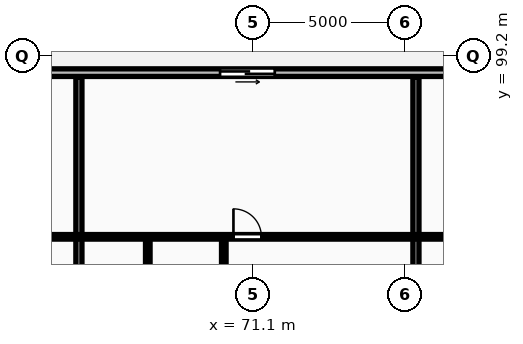
"""IFC4 building model, lengths in metres.
Left out: names, types, materials, properties, quantities, classifications, styles, units other than length and angle.
Written with IfcOpenShell. Run it as: python <this file> out.ifc"""

import sys

from ifc_helpers import new_model, si_unit, direction, frame, frame_2d, origin, place, context, subcontext, project, spatial, rectangle, extrude, element, fill, save


model = new_model("IFC4")
c1 = context("Model", 3, precision=1e-05, world=origin(), true_north=direction((0.0, 1.0)))
c2 = subcontext(c1, "Body", "Model", "MODEL_VIEW")
j1 = project(units=[si_unit("LENGTHUNIT", "METRE"), si_unit("PLANEANGLEUNIT", "RADIAN")], contexts=[c1])
p1 = place(None, origin())
s1 = spatial("IfcSite", under=j1, at=p1, CompositionType="ELEMENT")
p2 = place(p1, origin())
s2 = spatial("IfcBuilding", under=s1, at=p2, CompositionType="ELEMENT")
p3 = place(p2, frame((0.0, 0.0, 24.0)))
s3 = spatial("IfcBuildingStorey", under=s2, at=p3, CompositionType="ELEMENT", Elevation=24.0)
p4 = place(p3, frame((132.9, 98.65, 0.0), z_axis=(0.0, 0.0, 1.0), x_axis=(-1.0, 0.0, 0.0)))
e1 = element("IfcWall", 1, at=p4, inside=s3, PredefinedType="STANDARD", context=c2, shape_type="SweptSolid", body=[
    extrude(rectangle(XDim=77.6, YDim=0.25, at=frame_2d((38.8, 0.0))), origin(), (0.0, 0.0, 1.0), 2.97),
])
p5 = place(p4, frame((71.661, 0.0, 0.0)))
e2 = element("IfcOpeningElement", 2, at=p5, cuts=e1, PredefinedType="OPENING", context=c2, shape_type="SweptSolid", body=[
    extrude(rectangle(XDim=1.8, YDim=2.2, at=frame_2d((0.9, 1.1))), frame((0.0, 0.135, 0.0), z_axis=(0.0, -1.0, 0.0), x_axis=(1.0, 0.0, 0.0)), (0.0, 0.0, 1.0), 0.27),
])
p6 = place(p4, frame((61.079, 0.0, 0.0)))
e3 = element("IfcOpeningElement", 3, at=p6, cuts=e1, PredefinedType="OPENING", context=c2, shape_type="SweptSolid", body=[
    extrude(rectangle(XDim=1.8, YDim=2.2, at=frame_2d((0.9, 1.1))), frame((0.0, 0.135, 0.0), z_axis=(0.0, -1.0, 0.0), x_axis=(1.0, 0.0, 0.0)), (0.0, 0.0, 1.0), 0.27),
])
p7 = place(p4, frame((50.498, 0.0, 0.0)))
e4 = element("IfcOpeningElement", 4, at=p7, cuts=e1, PredefinedType="OPENING", context=c2, shape_type="SweptSolid", body=[
    extrude(rectangle(XDim=1.8, YDim=2.2, at=frame_2d((0.9, 1.1))), frame((0.0, 0.135, 0.0), z_axis=(0.0, -1.0, 0.0), x_axis=(1.0, 0.0, 0.0)), (0.0, 0.0, 1.0), 0.27),
])
p8 = place(p4, frame((39.412, 0.0, 0.0)))
e5 = element("IfcOpeningElement", 5, at=p8, cuts=e1, PredefinedType="OPENING", context=c2, shape_type="SweptSolid", body=[
    extrude(rectangle(XDim=1.8, YDim=2.2, at=frame_2d((0.9, 1.1))), frame((0.0, 0.135, 0.0), z_axis=(0.0, -1.0, 0.0), x_axis=(1.0, 0.0, 0.0)), (0.0, 0.0, 1.0), 0.27),
])
p9 = place(p4, frame((28.326, 0.0, 0.0)))
e6 = element("IfcOpeningElement", 6, at=p9, cuts=e1, PredefinedType="OPENING", context=c2, shape_type="SweptSolid", body=[
    extrude(rectangle(XDim=1.8, YDim=2.2, at=frame_2d((0.9, 1.1))), frame((0.0, 0.135, 0.0), z_axis=(0.0, -1.0, 0.0), x_axis=(1.0, 0.0, 0.0)), (0.0, 0.0, 1.0), 0.27),
])
p10 = place(p4, frame((17.744, 0.0, 0.0)))
e7 = element("IfcOpeningElement", 7, at=p10, cuts=e1, PredefinedType="OPENING", context=c2, shape_type="SweptSolid", body=[
    extrude(rectangle(XDim=1.8, YDim=2.2, at=frame_2d((0.9, 1.1))), frame((0.0, 0.135, 0.0), z_axis=(0.0, -1.0, 0.0), x_axis=(1.0, 0.0, 0.0)), (0.0, 0.0, 1.0), 0.27),
])
p11 = place(p4, frame((6.901, 0.0, 0.0)))
e8 = element("IfcOpeningElement", 8, at=p11, cuts=e1, PredefinedType="OPENING", context=c2, shape_type="SweptSolid", body=[
    extrude(rectangle(XDim=1.8, YDim=2.2, at=frame_2d((0.9, 1.1))), frame((0.0, 0.135, 0.0), z_axis=(0.0, -1.0, 0.0), x_axis=(1.0, 0.0, 0.0)), (0.0, 0.0, 1.0), 0.27),
])
p12 = place(p4, frame((0.6, 0.0, 0.85)))
e9 = element("IfcOpeningElement", 9, at=p12, cuts=e1, PredefinedType="OPENING", context=c2, shape_type="SweptSolid", body=[
    extrude(rectangle(XDim=1.8, YDim=1.8, at=frame_2d((0.9, 0.9))), frame((0.0, 0.135, 0.0), z_axis=(0.0, -1.0, 0.0), x_axis=(1.0, 0.0, 0.0)), (0.0, 0.0, 1.0), 0.27),
])
p13 = place(p3, frame((65.378, 69.43, 0.0), z_axis=(0.0, 0.0, 1.0), x_axis=(0.0, 1.0, 0.0)))
e10 = element("IfcWall", 10, at=p13, inside=s3, PredefinedType="PARTITIONING", context=c2, shape_type="SweptSolid", body=[
    extrude(rectangle(XDim=29.07, YDim=0.2, at=frame_2d((14.535, 0.0))), origin(), (0.0, 0.0, 1.0), 2.97),
])
p14 = place(p3, frame((55.38, 93.25, 0.0), z_axis=(0.0, 0.0, 1.0), x_axis=(1.0, 0.0, 0.0)))
e11 = element("IfcWall", 11, at=p14, inside=s3, PredefinedType="PARTITIONING", context=c2, shape_type="SweptSolid", body=[
    extrude(rectangle(XDim=9.918, YDim=0.15, at=frame_2d((4.959, 0.0))), origin(), (0.0, 0.0, 1.0), 2.97),
])
p15 = place(p14, frame((6.127, 0.0, 0.0)))
e12 = element("IfcOpeningElement", 12, at=p15, cuts=e11, PredefinedType="OPENING", context=c2, shape_type="SweptSolid", body=[
    extrude(rectangle(XDim=0.92, YDim=2.08, at=frame_2d((0.46, 1.04))), frame((0.0, 0.085, 0.0), z_axis=(0.0, -1.0, 0.0), x_axis=(1.0, 0.0, 0.0)), (0.0, 0.0, 1.0), 0.17),
])
p16 = place(p3, frame((76.464, 69.43, 0.0), z_axis=(0.0, 0.0, 1.0), x_axis=(0.0, 1.0, 0.0)))
e13 = element("IfcWall", 13, at=p16, inside=s3, PredefinedType="PARTITIONING", context=c2, shape_type="SweptSolid", body=[
    extrude(rectangle(XDim=29.07, YDim=0.2, at=frame_2d((14.535, 0.0))), origin(), (0.0, 0.0, 1.0), 2.22),
])
p17 = place(p3, frame((67.644, 88.19, 0.0), z_axis=(0.0, 0.0, 1.0), x_axis=(0.0, 1.0, 0.0)))
e14 = element("IfcWall", 14, at=p17, inside=s3, PredefinedType="PARTITIONING", context=c2, shape_type="SweptSolid", body=[
    extrude(rectangle(XDim=5.0, YDim=0.15, at=frame_2d((2.5, 0.0))), origin(), (0.0, 0.0, 1.0), 2.22),
])
p18 = place(p17, frame((0.419, 0.0, 0.0)))
e15 = element("IfcOpeningElement", 15, at=p18, cuts=e14, PredefinedType="OPENING", context=c2, shape_type="SweptSolid", body=[
    extrude(rectangle(XDim=0.84, YDim=2.04, at=frame_2d((0.42, 1.02))), frame((0.0, 0.085, 0.0), z_axis=(0.0, -1.0, 0.0), x_axis=(1.0, 0.0, 0.0)), (0.0, 0.0, 1.0), 0.17),
])
p19 = place(p3, frame((70.144, 88.19, 0.0), z_axis=(0.0, 0.0, 1.0), x_axis=(0.0, 1.0, 0.0)))
e16 = element("IfcWall", 16, at=p19, inside=s3, PredefinedType="PARTITIONING", context=c2, shape_type="SweptSolid", body=[
    extrude(rectangle(XDim=5.0, YDim=0.15, at=frame_2d((2.5, 0.0))), origin(), (0.0, 0.0, 1.0), 2.97),
])
p20 = place(p19, frame((0.4, 0.0, 0.0)))
e17 = element("IfcOpeningElement", 17, at=p20, cuts=e16, PredefinedType="OPENING", context=c2, shape_type="SweptSolid", body=[
    extrude(rectangle(XDim=0.84, YDim=2.04, at=frame_2d((0.42, 1.02))), frame((0.0, 0.085, 0.0), z_axis=(0.0, -1.0, 0.0), x_axis=(1.0, 0.0, 0.0)), (0.0, 0.0, 1.0), 0.17),
])
p21 = place(p3, frame((65.458, 93.25, 0.0), z_axis=(0.0, 0.0, 1.0), x_axis=(1.0, 0.0, 0.0)))
e18 = element("IfcWall", 18, at=p21, inside=s3, PredefinedType="PARTITIONING", context=c2, shape_type="SweptSolid", body=[
    extrude(rectangle(XDim=10.926, YDim=0.15, at=frame_2d((5.463, 0.0))), origin(), (0.0, 0.0, 1.0), 2.97),
])
p22 = place(p21, frame((5.003, 0.0, 0.0)))
e19 = element("IfcOpeningElement", 19, at=p22, cuts=e18, PredefinedType="OPENING", context=c2, shape_type="SweptSolid", body=[
    extrude(rectangle(XDim=0.92, YDim=2.08, at=frame_2d((0.46, 1.04))), frame((0.0, 0.085, 0.0), z_axis=(0.0, -1.0, 0.0), x_axis=(1.0, 0.0, 0.0)), (0.0, 0.0, 1.0), 0.17),
])
p23 = place(p3, frame((76.544, 93.25, 0.0), z_axis=(0.0, 0.0, 1.0), x_axis=(1.0, 0.0, 0.0)))
e20 = element("IfcWall", 20, at=p23, inside=s3, PredefinedType="PARTITIONING", context=c2, shape_type="SweptSolid", body=[
    extrude(rectangle(XDim=9.918, YDim=0.15, at=frame_2d((4.959, 0.0))), origin(), (0.0, 0.0, 1.0), 2.97),
])
p24 = place(p23, frame((4.499, 0.0, 0.0)))
e21 = element("IfcOpeningElement", 21, at=p24, cuts=e20, PredefinedType="OPENING", context=c2, shape_type="SweptSolid", body=[
    extrude(rectangle(XDim=0.92, YDim=2.08, at=frame_2d((0.46, 1.04))), frame((0.0, 0.085, 0.0), z_axis=(0.0, -1.0, 0.0), x_axis=(1.0, 0.0, 0.0)), (0.0, 0.0, 1.0), 0.17),
])
p25 = place(p6, origin())
e22 = element("IfcDoor", 22, at=p25, inside=s3, OperationType="SLIDING_TO_LEFT", PredefinedType="DOOR", context=c2, shape_type="SweptSolid", body=[
    extrude(rectangle(XDim=1.8, YDim=2.2, at=frame_2d((0.9, 1.1))), frame((0.0, 0.025, 0.0), z_axis=(0.0, -1.0, 0.0), x_axis=(1.0, 0.0, 0.0)), (0.0, 0.0, 1.0), 0.05),
])
fill(e3, e22)
p26 = place(p22, origin())
e23 = element("IfcDoor", 23, at=p26, inside=s3, OperationType="SINGLE_SWING_LEFT", PredefinedType="DOOR", context=c2, shape_type="SweptSolid", body=[
    extrude(rectangle(XDim=0.92, YDim=2.08, at=frame_2d((0.46, 1.04))), frame((0.0, 0.025, 0.0), z_axis=(0.0, -1.0, 0.0), x_axis=(1.0, 0.0, 0.0)), (0.0, 0.0, 1.0), 0.05),
])
fill(e19, e23)
save(model, sys.argv[1])
